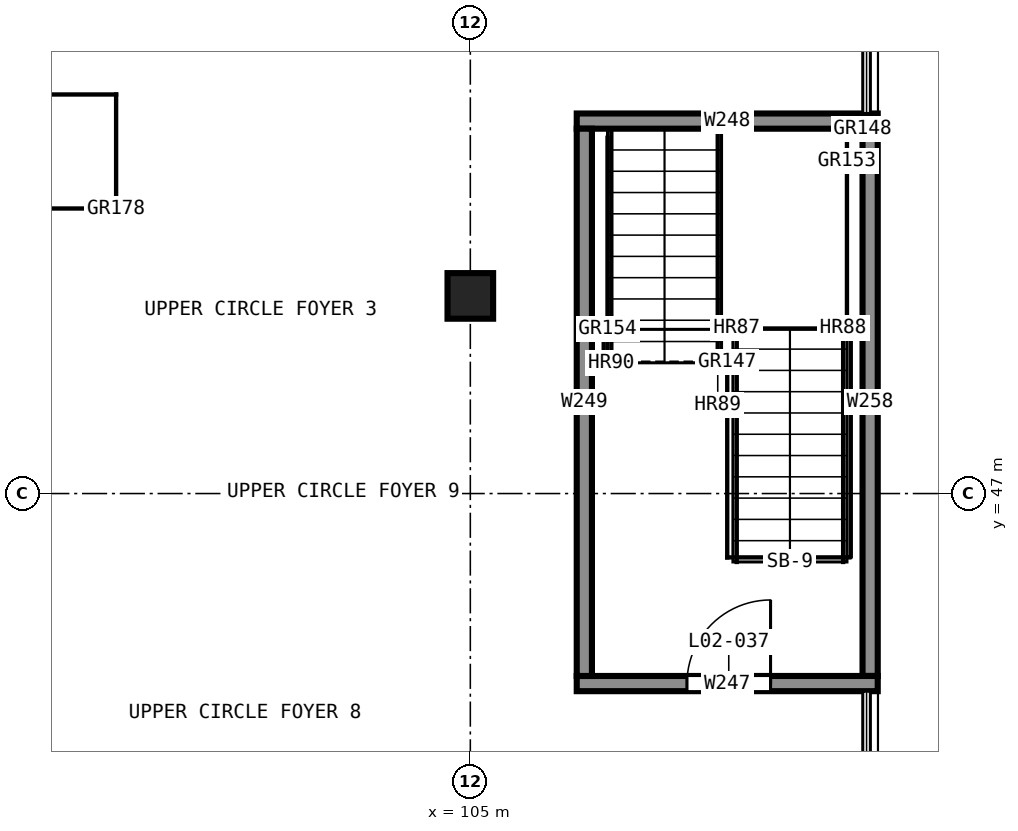
"""IFC4 building model, lengths in metres.
Left out: names, types, materials, properties, quantities, classifications, styles, units other than length and angle.
Written with IfcOpenShell. Run it as: python <this file> out.ifc"""

import sys

from ifc_helpers import new_model, si_unit, direction, frame, frame_2d, origin, origin_2d, place, context, subcontext, project, spatial, rectangle, extrude, element, fill, save


model = new_model("IFC4")
c1 = context("Model", 3, precision=1e-05, world=origin(), true_north=direction((0.0, 1.0)))
c2 = subcontext(c1, "Body", "Model", "MODEL_VIEW")
j1 = project(units=[si_unit("LENGTHUNIT", "METRE"), si_unit("PLANEANGLEUNIT", "RADIAN")], contexts=[c1])
p1 = place(None, origin())
s1 = spatial("IfcSite", under=j1, at=p1, CompositionType="ELEMENT")
p2 = place(p1, origin())
s2 = spatial("IfcBuilding", under=s1, at=p2, CompositionType="ELEMENT")
p3 = place(p2, frame((0.0, 0.0, 9.5)))
s3 = spatial("IfcBuildingStorey", under=s2, at=p3, CompositionType="ELEMENT", Elevation=9.5)
p4 = place(p3, frame((106.4, 44.5, 0.0), z_axis=(0.0, 0.0, 1.0), x_axis=(1.0, 0.0, 0.0)))
e1 = element("IfcWall", 1, at=p4, inside=s3, PredefinedType="SHEAR", context=c2, shape_type="SweptSolid", body=[
    extrude(rectangle(XDim=3.96, YDim=0.2, at=frame_2d((1.98, 0.0))), origin(), (0.0, 0.0, 1.0), 4.0),
])
p5 = place(p4, frame((1.45, 0.0, 0.0)))
e2 = element("IfcOpeningElement", 2, at=p5, cuts=e1, PredefinedType="OPENING", context=c2, shape_type="SweptSolid", body=[
    extrude(rectangle(XDim=1.1, YDim=2.1, at=frame_2d((0.55, 1.05))), frame((0.0, 0.11, 0.0), z_axis=(0.0, -1.0, 0.0), x_axis=(1.0, 0.0, 0.0)), (0.0, 0.0, 1.0), 0.22),
])
p6 = place(p3, frame((110.36, 51.9, 0.0), z_axis=(0.0, 0.0, 1.0), x_axis=(-1.0, 0.0, 0.0)))
e3 = element("IfcWall", 3, at=p6, inside=s3, PredefinedType="SHEAR", context=c2, shape_type="SweptSolid", body=[
    extrude(rectangle(XDim=3.96, YDim=0.2, at=frame_2d((1.98, 0.0))), origin(), (0.0, 0.0, 1.0), 4.0),
])
for number, where, z_axis, x_axis in (
    (4, (106.5, 51.8, 0.0), (0.0, 0.0, 1.0), (0.0, -1.0, 0.0)),
    (5, (110.26, 44.6, 0.0), (0.0, 0.0, 1.0), (0.0, 1.0, 0.0)),
):
    element("IfcWall", number, at=place(p3, frame(where, z_axis=z_axis, x_axis=x_axis)), inside=s3, PredefinedType="SHEAR", context=c2, shape_type="SweptSolid", body=[
        extrude(rectangle(XDim=7.2, YDim=0.2, at=frame_2d((3.6, 0.0))), origin(), (0.0, 0.0, 1.0), 4.0),
    ])
p7 = place(p3, frame((105.0, 49.6, 0.0), z_axis=(0.0, 0.0, 1.0), x_axis=(1.0, 0.0, 0.0)))
e6 = element("IfcColumn", 6, at=p7, inside=s3, PredefinedType="COLUMN", context=c2, shape_type="SweptSolid", body=[
    extrude(rectangle(XDim=0.6, YDim=0.6, at=origin_2d()), origin(), (0.0, 0.0, 1.0), 2.9),
])
p8 = place(p5, origin())
e7 = element("IfcDoor", 7, at=p8, inside=s3, OperationType="SINGLE_SWING_LEFT", PredefinedType="DOOR", context=c2, shape_type="SweptSolid", body=[
    extrude(rectangle(XDim=1.1, YDim=2.1, at=frame_2d((0.55, 1.05))), frame((0.0, 0.025, 0.0), z_axis=(0.0, -1.0, 0.0), x_axis=(1.0, 0.0, 0.0)), (0.0, 0.0, 1.0), 0.05),
])
fill(e2, e7)
save(model, sys.argv[1])
